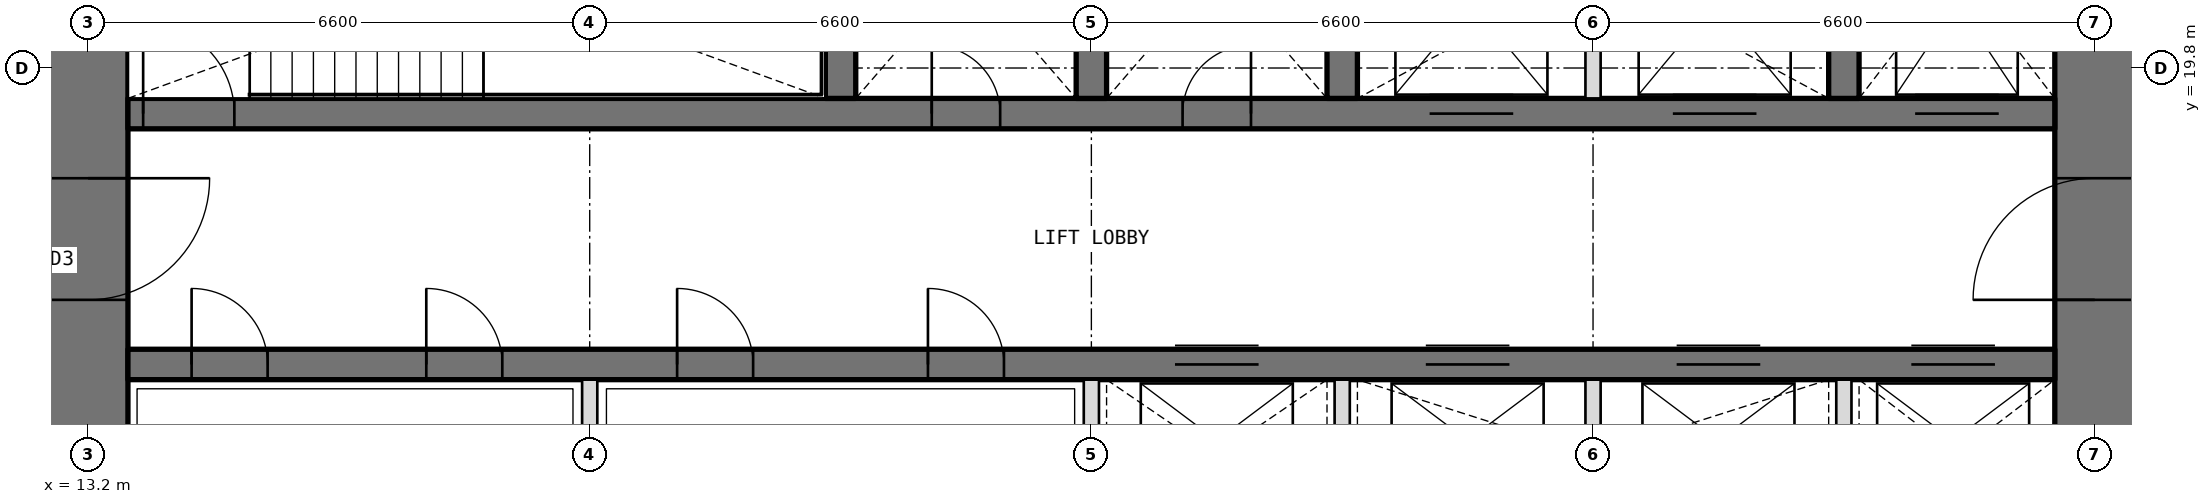
"""IFC4 building model, lengths in metres.
Left out: names, types, materials, properties, quantities, classifications, styles, units other than length and angle.
Written with IfcOpenShell. Run it as: python <this file> out.ifc"""

import sys

from ifc_helpers import new_model, si_unit, direction, frame, frame_2d, origin, place, context, subcontext, project, spatial, rectangle, extrude, element, fill, save


model = new_model("IFC4")
c1 = context("Model", 3, precision=1e-05, world=origin(), true_north=direction((0.0, 1.0)))
c2 = subcontext(c1, "Body", "Model", "MODEL_VIEW")
j1 = project(units=[si_unit("LENGTHUNIT", "METRE"), si_unit("PLANEANGLEUNIT", "RADIAN")], contexts=[c1])
p1 = place(None, origin())
s1 = spatial("IfcSite", under=j1, at=p1, CompositionType="ELEMENT")
p2 = place(p1, origin())
s2 = spatial("IfcBuilding", under=s1, at=p2, CompositionType="ELEMENT")
p3 = place(p2, frame((0.0, 0.0, 103.2)))
s3 = spatial("IfcBuildingStorey", under=s2, at=p3, CompositionType="ELEMENT", Elevation=103.2)
p4 = place(p3, frame((39.6, 13.725, 0.0), z_axis=(0.0, 0.0, 1.0), x_axis=(0.0, 1.0, 0.0)))
e1 = element("IfcWall", 1, at=p4, inside=s3, PredefinedType="SHEAR", context=c2, shape_type="SweptSolid", body=[
    extrude(rectangle(XDim=18.75, YDim=1.05, at=frame_2d((9.375, 0.0))), origin(), (0.0, 0.0, 1.0), 4.2),
])
p5 = place(p4, frame((3.025, 0.0, 0.0)))
e2 = element("IfcOpeningElement", 2, at=p5, cuts=e1, PredefinedType="OPENING", context=c2, shape_type="SweptSolid", body=[
    extrude(rectangle(XDim=1.6, YDim=2.1, at=frame_2d((0.8, 1.05))), frame((0.0, 0.535, 0.0), z_axis=(0.0, -1.0, 0.0), x_axis=(1.0, 0.0, 0.0)), (0.0, 0.0, 1.0), 1.07),
])
p6 = place(p4, frame((13.825, 0.0, 0.0)))
e3 = element("IfcOpeningElement", 3, at=p6, cuts=e1, PredefinedType="OPENING", context=c2, shape_type="SweptSolid", body=[
    extrude(rectangle(XDim=1.6, YDim=2.1, at=frame_2d((0.8, 1.05))), frame((0.0, 0.535, 0.0), z_axis=(0.0, -1.0, 0.0), x_axis=(1.0, 0.0, 0.0)), (0.0, 0.0, 1.0), 1.07),
])
p7 = place(p3, frame((13.2, 32.475, 0.0), z_axis=(0.0, 0.0, 1.0), x_axis=(0.0, -1.0, 0.0)))
e4 = element("IfcWall", 4, at=p7, inside=s3, PredefinedType="SHEAR", context=c2, shape_type="SweptSolid", body=[
    extrude(rectangle(XDim=18.75, YDim=1.05, at=frame_2d((9.375, 0.0))), origin(), (0.0, 0.0, 1.0), 4.2),
])
p8 = place(p7, frame((14.125, 0.0, 0.0)))
e5 = element("IfcOpeningElement", 5, at=p8, cuts=e4, PredefinedType="OPENING", context=c2, shape_type="SweptSolid", body=[
    extrude(rectangle(XDim=1.6, YDim=2.1, at=frame_2d((0.8, 1.05))), frame((0.0, 0.535, 0.0), z_axis=(0.0, -1.0, 0.0), x_axis=(1.0, 0.0, 0.0)), (0.0, 0.0, 1.0), 1.07),
])
p9 = place(p7, frame((3.325, 0.0, 0.0)))
e6 = element("IfcOpeningElement", 6, at=p9, cuts=e4, PredefinedType="OPENING", context=c2, shape_type="SweptSolid", body=[
    extrude(rectangle(XDim=1.6, YDim=2.1, at=frame_2d((0.8, 1.05))), frame((0.0, 0.535, 0.0), z_axis=(0.0, -1.0, 0.0), x_axis=(1.0, 0.0, 0.0)), (0.0, 0.0, 1.0), 1.07),
])
p10 = place(p3, frame((13.725, 15.9, 0.0), z_axis=(0.0, 0.0, 1.0), x_axis=(1.0, 0.0, 0.0)))
e7 = element("IfcWall", 7, at=p10, inside=s3, PredefinedType="SHEAR", context=c2, shape_type="SweptSolid", body=[
    extrude(rectangle(XDim=25.35, YDim=0.4, at=frame_2d((12.675, 0.0))), origin(), (0.0, 0.0, 1.0), 4.2),
])
p11 = place(p10, frame((0.837, 0.0, 0.0)))
e8 = element("IfcOpeningElement", 8, at=p11, cuts=e7, PredefinedType="OPENING", context=c2, shape_type="SweptSolid", body=[
    extrude(rectangle(XDim=1.0, YDim=2.1, at=frame_2d((0.5, 1.05))), frame((0.0, 0.21, 0.0), z_axis=(0.0, -1.0, 0.0), x_axis=(1.0, 0.0, 0.0)), (0.0, 0.0, 1.0), 0.42),
])
p12 = place(p10, frame((3.925, 0.0, 0.0)))
e9 = element("IfcOpeningElement", 9, at=p12, cuts=e7, PredefinedType="OPENING", context=c2, shape_type="SweptSolid", body=[
    extrude(rectangle(XDim=1.0, YDim=2.1, at=frame_2d((0.5, 1.05))), frame((0.0, 0.21, 0.0), z_axis=(0.0, -1.0, 0.0), x_axis=(1.0, 0.0, 0.0)), (0.0, 0.0, 1.0), 0.42),
])
p13 = place(p10, frame((7.225, 0.0, 0.0)))
e10 = element("IfcOpeningElement", 10, at=p13, cuts=e7, PredefinedType="OPENING", context=c2, shape_type="SweptSolid", body=[
    extrude(rectangle(XDim=1.0, YDim=2.1, at=frame_2d((0.5, 1.05))), frame((0.0, 0.21, 0.0), z_axis=(0.0, -1.0, 0.0), x_axis=(1.0, 0.0, 0.0)), (0.0, 0.0, 1.0), 0.42),
])
p14 = place(p10, frame((10.525, 0.0, 0.0)))
e11 = element("IfcOpeningElement", 11, at=p14, cuts=e7, PredefinedType="OPENING", context=c2, shape_type="SweptSolid", body=[
    extrude(rectangle(XDim=1.0, YDim=2.1, at=frame_2d((0.5, 1.05))), frame((0.0, 0.21, 0.0), z_axis=(0.0, -1.0, 0.0), x_axis=(1.0, 0.0, 0.0)), (0.0, 0.0, 1.0), 0.42),
])
p15 = place(p10, frame((13.775, 0.0, 0.0)))
e12 = element("IfcOpeningElement", 12, at=p15, cuts=e7, PredefinedType="OPENING", context=c2, shape_type="SweptSolid", body=[
    extrude(rectangle(XDim=1.1, YDim=2.1, at=frame_2d((0.55, 1.05))), frame((0.0, 0.21, 0.0), z_axis=(0.0, -1.0, 0.0), x_axis=(1.0, 0.0, 0.0)), (0.0, 0.0, 1.0), 0.42),
])
p16 = place(p10, frame((17.075, 0.0, 0.0)))
e13 = element("IfcOpeningElement", 13, at=p16, cuts=e7, PredefinedType="OPENING", context=c2, shape_type="SweptSolid", body=[
    extrude(rectangle(XDim=1.1, YDim=2.1, at=frame_2d((0.55, 1.05))), frame((0.0, 0.21, 0.0), z_axis=(0.0, -1.0, 0.0), x_axis=(1.0, 0.0, 0.0)), (0.0, 0.0, 1.0), 0.42),
])
p17 = place(p10, frame((20.375, 0.0, 0.0)))
e14 = element("IfcOpeningElement", 14, at=p17, cuts=e7, PredefinedType="OPENING", context=c2, shape_type="SweptSolid", body=[
    extrude(rectangle(XDim=1.1, YDim=2.1, at=frame_2d((0.55, 1.05))), frame((0.0, 0.21, 0.0), z_axis=(0.0, -1.0, 0.0), x_axis=(1.0, 0.0, 0.0)), (0.0, 0.0, 1.0), 0.42),
])
p18 = place(p10, frame((23.462, 0.0, 0.0)))
e15 = element("IfcOpeningElement", 15, at=p18, cuts=e7, PredefinedType="OPENING", context=c2, shape_type="SweptSolid", body=[
    extrude(rectangle(XDim=1.1, YDim=2.1, at=frame_2d((0.55, 1.05))), frame((0.0, 0.21, 0.0), z_axis=(0.0, -1.0, 0.0), x_axis=(1.0, 0.0, 0.0)), (0.0, 0.0, 1.0), 0.42),
])
p19 = place(p3, frame((13.725, 19.2, 0.0), z_axis=(0.0, 0.0, 1.0), x_axis=(1.0, 0.0, 0.0)))
e16 = element("IfcWall", 16, at=p19, inside=s3, PredefinedType="SHEAR", context=c2, shape_type="SweptSolid", body=[
    extrude(rectangle(XDim=25.35, YDim=0.4, at=frame_2d((12.675, 0.0))), origin(), (0.0, 0.0, 1.0), 4.2),
])
p20 = place(p19, frame((10.575, 0.0, 0.0)))
e17 = element("IfcOpeningElement", 17, at=p20, cuts=e16, PredefinedType="OPENING", context=c2, shape_type="SweptSolid", body=[
    extrude(rectangle(XDim=0.9, YDim=2.1, at=frame_2d((0.45, 1.05))), frame((0.0, 0.21, 0.0), z_axis=(0.0, -1.0, 0.0), x_axis=(1.0, 0.0, 0.0)), (0.0, 0.0, 1.0), 0.42),
])
p21 = place(p19, frame((13.875, 0.0, 0.0)))
e18 = element("IfcOpeningElement", 18, at=p21, cuts=e16, PredefinedType="OPENING", context=c2, shape_type="SweptSolid", body=[
    extrude(rectangle(XDim=0.9, YDim=2.1, at=frame_2d((0.45, 1.05))), frame((0.0, 0.21, 0.0), z_axis=(0.0, -1.0, 0.0), x_axis=(1.0, 0.0, 0.0)), (0.0, 0.0, 1.0), 0.42),
])
p22 = place(p19, frame((0.2, 0.0, 0.0)))
e19 = element("IfcOpeningElement", 19, at=p22, cuts=e16, PredefinedType="OPENING", context=c2, shape_type="SweptSolid", body=[
    extrude(rectangle(XDim=1.2, YDim=2.1, at=frame_2d((0.6, 1.05))), frame((0.0, 0.21, 0.0), z_axis=(0.0, -1.0, 0.0), x_axis=(1.0, 0.0, 0.0)), (0.0, 0.0, 1.0), 0.42),
])
p23 = place(p19, frame((23.512, 0.0, 0.0)))
e20 = element("IfcOpeningElement", 20, at=p23, cuts=e16, PredefinedType="OPENING", context=c2, shape_type="SweptSolid", body=[
    extrude(rectangle(XDim=1.1, YDim=2.1, at=frame_2d((0.55, 1.05))), frame((0.0, 0.21, 0.0), z_axis=(0.0, -1.0, 0.0), x_axis=(1.0, 0.0, 0.0)), (0.0, 0.0, 1.0), 0.42),
])
p24 = place(p19, frame((17.125, 0.0, 0.0)))
e21 = element("IfcOpeningElement", 21, at=p24, cuts=e16, PredefinedType="OPENING", context=c2, shape_type="SweptSolid", body=[
    extrude(rectangle(XDim=1.1, YDim=2.1, at=frame_2d((0.55, 1.05))), frame((0.0, 0.21, 0.0), z_axis=(0.0, -1.0, 0.0), x_axis=(1.0, 0.0, 0.0)), (0.0, 0.0, 1.0), 0.42),
])
p25 = place(p19, frame((20.325, 0.0, 0.0)))
e22 = element("IfcOpeningElement", 22, at=p25, cuts=e16, PredefinedType="OPENING", context=c2, shape_type="SweptSolid", body=[
    extrude(rectangle(XDim=1.1, YDim=2.1, at=frame_2d((0.55, 1.05))), frame((0.0, 0.21, 0.0), z_axis=(0.0, -1.0, 0.0), x_axis=(1.0, 0.0, 0.0)), (0.0, 0.0, 1.0), 0.42),
])
for number, where, z_axis, x_axis in (
    (23, (23.1, 19.4, 0.0), (0.0, 0.0, 1.0), (0.0, 1.0, 0.0)),
    (24, (26.4, 19.4, 0.0), (0.0, 0.0, 1.0), (0.0, 1.0, 0.0)),
    (25, (29.7, 19.4, 0.0), (0.0, 0.0, 1.0), (0.0, 1.0, 0.0)),
    (26, (36.3, 19.4, 0.0), (0.0, 0.0, 1.0), (0.0, 1.0, 0.0)),
):
    element("IfcWall", number, at=place(p3, frame(where, z_axis=z_axis, x_axis=x_axis)), inside=s3, PredefinedType="SHEAR", context=c2, shape_type="SweptSolid", body=[
        extrude(rectangle(XDim=3.35, YDim=0.4, at=frame_2d((1.675, 0.0))), origin(), (0.0, 0.0, 1.0), 4.2),
    ])
for number, where, z_axis, x_axis in (
    (27, (19.8, 13.725, 0.0), (0.0, 0.0, 1.0), (0.0, 1.0, 0.0)),
    (28, (26.4, 13.725, 0.0), (0.0, 0.0, 1.0), (0.0, 1.0, 0.0)),
    (29, (29.7, 13.725, 0.0), (0.0, 0.0, 1.0), (0.0, 1.0, 0.0)),
    (30, (33.0, 13.725, 0.0), (0.0, 0.0, 1.0), (0.0, 1.0, 0.0)),
    (31, (36.3, 13.725, 0.0), (0.0, 0.0, 1.0), (0.0, 1.0, 0.0)),
):
    element("IfcWall", number, at=place(p3, frame(where, z_axis=z_axis, x_axis=x_axis)), inside=s3, PredefinedType="PARTITIONING", context=c2, shape_type="SweptSolid", body=[
        extrude(rectangle(XDim=1.975, YDim=0.2, at=frame_2d((0.987, 0.0))), origin(), (0.0, 0.0, 1.0), 4.2),
    ])
p26 = place(p3, frame((33.0, 19.4, 0.0), z_axis=(0.0, 0.0, 1.0), x_axis=(0.0, 1.0, 0.0)))
e32 = element("IfcWall", 32, at=p26, inside=s3, PredefinedType="PARTITIONING", context=c2, shape_type="SweptSolid", body=[
    extrude(rectangle(XDim=3.35, YDim=0.2, at=frame_2d((1.675, 0.0))), origin(), (0.0, 0.0, 1.0), 4.2),
])
p27 = place(p20, origin())
e33 = element("IfcDoor", 33, at=p27, inside=s3, OperationType="SINGLE_SWING_LEFT", PredefinedType="DOOR", context=c2, shape_type="SweptSolid", body=[
    extrude(rectangle(XDim=0.9, YDim=2.1, at=frame_2d((0.45, 1.05))), frame((0.0, 0.025, 0.0), z_axis=(0.0, -1.0, 0.0), x_axis=(1.0, 0.0, 0.0)), (0.0, 0.0, 1.0), 0.05),
])
fill(e17, e33)
p28 = place(p21, origin())
e34 = element("IfcDoor", 34, at=p28, inside=s3, OperationType="SINGLE_SWING_RIGHT", PredefinedType="DOOR", context=c2, shape_type="SweptSolid", body=[
    extrude(rectangle(XDim=0.9, YDim=2.1, at=frame_2d((0.45, 1.05))), frame((0.0, 0.025, 0.0), z_axis=(0.0, -1.0, 0.0), x_axis=(1.0, 0.0, 0.0)), (0.0, 0.0, 1.0), 0.05),
])
fill(e18, e34)
p29 = place(p11, origin())
e35 = element("IfcDoor", 35, at=p29, inside=s3, OperationType="SINGLE_SWING_LEFT", PredefinedType="DOOR", context=c2, shape_type="SweptSolid", body=[
    extrude(rectangle(XDim=1.0, YDim=2.1, at=frame_2d((0.5, 1.05))), frame((0.0, 0.025, 0.0), z_axis=(0.0, -1.0, 0.0), x_axis=(1.0, 0.0, 0.0)), (0.0, 0.0, 1.0), 0.05),
])
fill(e8, e35)
p30 = place(p12, origin())
e36 = element("IfcDoor", 36, at=p30, inside=s3, OperationType="SINGLE_SWING_LEFT", PredefinedType="DOOR", context=c2, shape_type="SweptSolid", body=[
    extrude(rectangle(XDim=1.0, YDim=2.1, at=frame_2d((0.5, 1.05))), frame((0.0, 0.025, 0.0), z_axis=(0.0, -1.0, 0.0), x_axis=(1.0, 0.0, 0.0)), (0.0, 0.0, 1.0), 0.05),
])
fill(e9, e36)
p31 = place(p13, origin())
e37 = element("IfcDoor", 37, at=p31, inside=s3, OperationType="SINGLE_SWING_LEFT", PredefinedType="DOOR", context=c2, shape_type="SweptSolid", body=[
    extrude(rectangle(XDim=1.0, YDim=2.1, at=frame_2d((0.5, 1.05))), frame((0.0, 0.025, 0.0), z_axis=(0.0, -1.0, 0.0), x_axis=(1.0, 0.0, 0.0)), (0.0, 0.0, 1.0), 0.05),
])
fill(e10, e37)
p32 = place(p14, origin())
e38 = element("IfcDoor", 38, at=p32, inside=s3, OperationType="SINGLE_SWING_LEFT", PredefinedType="DOOR", context=c2, shape_type="SweptSolid", body=[
    extrude(rectangle(XDim=1.0, YDim=2.1, at=frame_2d((0.5, 1.05))), frame((0.0, 0.025, 0.0), z_axis=(0.0, -1.0, 0.0), x_axis=(1.0, 0.0, 0.0)), (0.0, 0.0, 1.0), 0.05),
])
fill(e11, e38)
p33 = place(p22, origin())
e39 = element("IfcDoor", 39, at=p33, inside=s3, OperationType="SINGLE_SWING_LEFT", PredefinedType="DOOR", context=c2, shape_type="SweptSolid", body=[
    extrude(rectangle(XDim=1.2, YDim=2.1, at=frame_2d((0.6, 1.05))), frame((0.0, 0.025, 0.0), z_axis=(0.0, -1.0, 0.0), x_axis=(1.0, 0.0, 0.0)), (0.0, 0.0, 1.0), 0.05),
])
fill(e19, e39)
p34 = place(p8, origin())
e40 = element("IfcDoor", 40, at=p34, inside=s3, OperationType="DOUBLE_DOOR_DOUBLE_SWING", PredefinedType="DOOR", context=c2, shape_type="SweptSolid", body=[
    extrude(rectangle(XDim=1.6, YDim=2.1, at=frame_2d((0.8, 1.05))), frame((0.0, 0.025, 0.0), z_axis=(0.0, -1.0, 0.0), x_axis=(1.0, 0.0, 0.0)), (0.0, 0.0, 1.0), 0.05),
])
fill(e5, e40)
p35 = place(p5, origin())
e41 = element("IfcDoor", 41, at=p35, inside=s3, OperationType="DOUBLE_DOOR_DOUBLE_SWING", PredefinedType="DOOR", context=c2, shape_type="SweptSolid", body=[
    extrude(rectangle(XDim=1.6, YDim=2.1, at=frame_2d((0.8, 1.05))), frame((0.0, 0.025, 0.0), z_axis=(0.0, -1.0, 0.0), x_axis=(1.0, 0.0, 0.0)), (0.0, 0.0, 1.0), 0.05),
])
fill(e2, e41)
p36 = place(p15, origin())
e42 = element("IfcDoor", 42, at=p36, inside=s3, OperationType="DOUBLE_DOOR_SLIDING", PredefinedType="DOOR", context=c2, shape_type="SweptSolid", body=[
    extrude(rectangle(XDim=1.1, YDim=2.1, at=frame_2d((0.55, 1.05))), frame((0.0, 0.025, 0.0), z_axis=(0.0, -1.0, 0.0), x_axis=(1.0, 0.0, 0.0)), (0.0, 0.0, 1.0), 0.05),
])
fill(e12, e42)
p37 = place(p16, origin())
e43 = element("IfcDoor", 43, at=p37, inside=s3, OperationType="DOUBLE_DOOR_SLIDING", PredefinedType="DOOR", context=c2, shape_type="SweptSolid", body=[
    extrude(rectangle(XDim=1.1, YDim=2.1, at=frame_2d((0.55, 1.05))), frame((0.0, 0.025, 0.0), z_axis=(0.0, -1.0, 0.0), x_axis=(1.0, 0.0, 0.0)), (0.0, 0.0, 1.0), 0.05),
])
fill(e13, e43)
p38 = place(p17, origin())
e44 = element("IfcDoor", 44, at=p38, inside=s3, OperationType="DOUBLE_DOOR_SLIDING", PredefinedType="DOOR", context=c2, shape_type="SweptSolid", body=[
    extrude(rectangle(XDim=1.1, YDim=2.1, at=frame_2d((0.55, 1.05))), frame((0.0, 0.025, 0.0), z_axis=(0.0, -1.0, 0.0), x_axis=(1.0, 0.0, 0.0)), (0.0, 0.0, 1.0), 0.05),
])
fill(e14, e44)
p39 = place(p18, origin())
e45 = element("IfcDoor", 45, at=p39, inside=s3, OperationType="DOUBLE_DOOR_SLIDING", PredefinedType="DOOR", context=c2, shape_type="SweptSolid", body=[
    extrude(rectangle(XDim=1.1, YDim=2.1, at=frame_2d((0.55, 1.05))), frame((0.0, 0.025, 0.0), z_axis=(0.0, -1.0, 0.0), x_axis=(1.0, 0.0, 0.0)), (0.0, 0.0, 1.0), 0.05),
])
fill(e15, e45)
p40 = place(p23, origin())
e46 = element("IfcDoor", 46, at=p40, inside=s3, OperationType="DOUBLE_DOOR_SLIDING", PredefinedType="DOOR", context=c2, shape_type="SweptSolid", body=[
    extrude(rectangle(XDim=1.1, YDim=2.1, at=frame_2d((0.55, 1.05))), frame((0.0, 0.025, 0.0), z_axis=(0.0, -1.0, 0.0), x_axis=(1.0, 0.0, 0.0)), (0.0, 0.0, 1.0), 0.05),
])
fill(e20, e46)
p41 = place(p24, origin())
e47 = element("IfcDoor", 47, at=p41, inside=s3, OperationType="DOUBLE_DOOR_SLIDING", PredefinedType="DOOR", context=c2, shape_type="SweptSolid", body=[
    extrude(rectangle(XDim=1.1, YDim=2.1, at=frame_2d((0.55, 1.05))), frame((0.0, 0.025, 0.0), z_axis=(0.0, -1.0, 0.0), x_axis=(1.0, 0.0, 0.0)), (0.0, 0.0, 1.0), 0.05),
])
fill(e21, e47)
p42 = place(p25, origin())
e48 = element("IfcDoor", 48, at=p42, inside=s3, OperationType="DOUBLE_DOOR_SLIDING", PredefinedType="DOOR", context=c2, shape_type="SweptSolid", body=[
    extrude(rectangle(XDim=1.1, YDim=2.1, at=frame_2d((0.55, 1.05))), frame((0.0, 0.025, 0.0), z_axis=(0.0, -1.0, 0.0), x_axis=(1.0, 0.0, 0.0)), (0.0, 0.0, 1.0), 0.05),
])
fill(e22, e48)
save(model, sys.argv[1])
